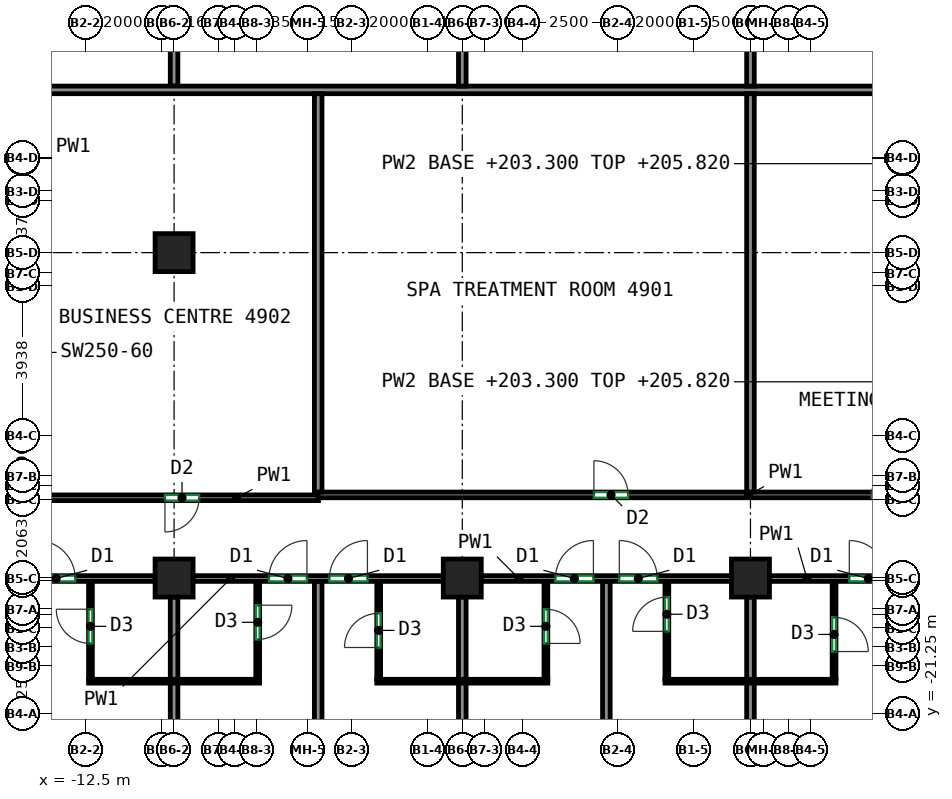
"""IFC4 building model, lengths in metres.
Left out: names, types, materials, properties, quantities, classifications, styles, units other than length and angle.
Written with IfcOpenShell. Run it as: python <this file> out.ifc"""

import sys

from ifc_helpers import new_model, si_unit, direction, frame, frame_2d, origin, origin_2d, place, context, subcontext, project, spatial, rectangle, extrude, source, transform, mapped, element, fill, save


model = new_model("IFC4")
c1 = context("Model", 3, precision=1e-05, world=origin(), true_north=direction((0.0, 1.0)))
c2 = subcontext(c1, "Body", "Model", "MODEL_VIEW")
j1 = project(units=[si_unit("LENGTHUNIT", "METRE"), si_unit("PLANEANGLEUNIT", "RADIAN")], contexts=[c1])
p1 = place(None, origin())
s1 = spatial("IfcSite", under=j1, at=p1, CompositionType="ELEMENT")
p2 = place(p1, origin())
s2 = spatial("IfcBuilding", under=s1, at=p2, CompositionType="ELEMENT")
p3 = place(p2, frame((0.0, 0.0, 203.3)))
s3 = spatial("IfcBuildingStorey", under=s2, at=p3, CompositionType="ELEMENT", Elevation=203.3)
m1 = source(origin(), c2, "Body", "SweptSolid", [
    extrude(rectangle(XDim=1.0, YDim=1.0, at=origin_2d()), origin(), (0.0, 0.0, 1.0), 3.12),
])
for number, where, z_axis, x_axis in (
    (1, (-10.167, -17.688, 0.0), (0.0, 0.0, 1.0), (1.0, 0.0, 0.0)),
    (2, (-10.167, -9.125, 0.0), (0.0, 0.0, 1.0), (1.0, 0.0, 0.0)),
    (3, (-2.583, -17.688, 0.0), (0.0, 0.0, 1.0), (1.0, 0.0, 0.0)),
    (4, (5.0, -17.688, 0.0), (0.0, 0.0, 1.0), (1.0, 0.0, 0.0)),
):
    element("IfcColumn", number, at=place(p3, frame(where, z_axis=z_axis, x_axis=x_axis)), inside=s3, PredefinedType="COLUMN", context=c2, shape_type="MappedRepresentation", body=[
        mapped(m1, transform((0.0, 0.0, 0.0))),
    ])
p4 = place(p3, frame((-18.9, -17.7, 0.0), z_axis=(0.0, 0.0, 1.0), x_axis=(1.0, 0.0, 0.0)))
e5 = element("IfcWall", 5, at=p4, inside=s3, PredefinedType="PARTITIONING", context=c2, shape_type="SweptSolid", body=[
    extrude(rectangle(XDim=8.233, YDim=0.15, at=frame_2d((4.116, 0.0))), origin(), (0.0, 0.0, 1.0), 2.52),
])
p5 = place(p4, frame((1.135, 0.0, 0.0)))
e6 = element("IfcOpeningElement", 6, at=p5, cuts=e5, PredefinedType="OPENING", context=c2, shape_type="SweptSolid", body=[
    extrude(rectangle(XDim=1.0, YDim=2.1, at=frame_2d((0.5, 1.05))), frame((0.0, 0.085, 0.0), z_axis=(0.0, -1.0, 0.0), x_axis=(1.0, 0.0, 0.0)), (0.0, 0.0, 1.0), 0.17),
])
p6 = place(p4, frame((5.131, 0.0, 0.0)))
e7 = element("IfcOpeningElement", 7, at=p6, cuts=e5, PredefinedType="OPENING", context=c2, shape_type="SweptSolid", body=[
    extrude(rectangle(XDim=1.0, YDim=2.1, at=frame_2d((0.5, 1.05))), frame((0.0, 0.085, 0.0), z_axis=(0.0, -1.0, 0.0), x_axis=(1.0, 0.0, 0.0)), (0.0, 0.0, 1.0), 0.17),
])
p7 = place(p3, frame((-9.667, -17.7, 0.0), z_axis=(0.0, 0.0, 1.0), x_axis=(1.0, 0.0, 0.0)))
e8 = element("IfcWall", 8, at=p7, inside=s3, PredefinedType="PARTITIONING", context=c2, shape_type="SweptSolid", body=[
    extrude(rectangle(XDim=6.584, YDim=0.15, at=frame_2d((3.292, 0.0))), origin(), (0.0, 0.0, 1.0), 3.12),
])
p8 = place(p7, frame((1.996, 0.0, 0.0)))
e9 = element("IfcOpeningElement", 9, at=p8, cuts=e8, PredefinedType="OPENING", context=c2, shape_type="SweptSolid", body=[
    extrude(rectangle(XDim=1.0, YDim=2.1, at=frame_2d((0.5, 1.05))), frame((0.0, 0.085, 0.0), z_axis=(0.0, -1.0, 0.0), x_axis=(1.0, 0.0, 0.0)), (0.0, 0.0, 1.0), 0.17),
])
p9 = place(p7, frame((3.588, 0.0, 0.0)))
e10 = element("IfcOpeningElement", 10, at=p9, cuts=e8, PredefinedType="OPENING", context=c2, shape_type="SweptSolid", body=[
    extrude(rectangle(XDim=1.0, YDim=2.1, at=frame_2d((0.5, 1.05))), frame((0.0, 0.085, 0.0), z_axis=(0.0, -1.0, 0.0), x_axis=(1.0, 0.0, 0.0)), (0.0, 0.0, 1.0), 0.17),
])
p10 = place(p3, frame((-2.083, -17.7, 0.0), z_axis=(0.0, 0.0, 1.0), x_axis=(1.0, 0.0, 0.0)))
e11 = element("IfcWall", 11, at=p10, inside=s3, PredefinedType="PARTITIONING", context=c2, shape_type="SweptSolid", body=[
    extrude(rectangle(XDim=6.583, YDim=0.15, at=frame_2d((3.292, 0.0))), origin(), (0.0, 0.0, 1.0), 3.12),
])
p11 = place(p10, frame((1.95, 0.0, 0.0)))
e12 = element("IfcOpeningElement", 12, at=p11, cuts=e11, PredefinedType="OPENING", context=c2, shape_type="SweptSolid", body=[
    extrude(rectangle(XDim=1.0, YDim=2.1, at=frame_2d((0.5, 1.05))), frame((0.0, 0.085, 0.0), z_axis=(0.0, -1.0, 0.0), x_axis=(1.0, 0.0, 0.0)), (0.0, 0.0, 1.0), 0.17),
])
p12 = place(p10, frame((3.632, 0.0, 0.0)))
e13 = element("IfcOpeningElement", 13, at=p12, cuts=e11, PredefinedType="OPENING", context=c2, shape_type="SweptSolid", body=[
    extrude(rectangle(XDim=1.0, YDim=2.1, at=frame_2d((0.5, 1.05))), frame((0.0, 0.085, 0.0), z_axis=(0.0, -1.0, 0.0), x_axis=(1.0, 0.0, 0.0)), (0.0, 0.0, 1.0), 0.17),
])
p13 = place(p3, frame((5.5, -17.7, 0.0), z_axis=(0.0, 0.0, 1.0), x_axis=(1.0, 0.0, 0.0)))
e14 = element("IfcWall", 14, at=p13, inside=s3, PredefinedType="PARTITIONING", context=c2, shape_type="SweptSolid", body=[
    extrude(rectangle(XDim=6.583, YDim=0.15, at=frame_2d((3.292, 0.0))), origin(), (0.0, 0.0, 1.0), 3.12),
])
p14 = place(p13, frame((2.101, 0.0, 0.0)))
e15 = element("IfcOpeningElement", 15, at=p14, cuts=e14, PredefinedType="OPENING", context=c2, shape_type="SweptSolid", body=[
    extrude(rectangle(XDim=1.0, YDim=2.1, at=frame_2d((0.5, 1.05))), frame((0.0, 0.085, 0.0), z_axis=(0.0, -1.0, 0.0), x_axis=(1.0, 0.0, 0.0)), (0.0, 0.0, 1.0), 0.17),
])
p15 = place(p13, frame((3.587, 0.0, 0.0)))
e16 = element("IfcOpeningElement", 16, at=p15, cuts=e14, PredefinedType="OPENING", context=c2, shape_type="SweptSolid", body=[
    extrude(rectangle(XDim=1.0, YDim=2.1, at=frame_2d((0.5, 1.05))), frame((0.0, 0.085, 0.0), z_axis=(0.0, -1.0, 0.0), x_axis=(1.0, 0.0, 0.0)), (0.0, 0.0, 1.0), 0.17),
])
p16 = place(p3, frame((-6.365, -15.575, 0.0), z_axis=(0.0, 0.0, 1.0), x_axis=(-1.0, 0.0, 0.0)))
e17 = element("IfcWall", 17, at=p16, inside=s3, PredefinedType="PARTITIONING", context=c2, shape_type="SweptSolid", body=[
    extrude(rectangle(XDim=7.185, YDim=0.15, at=frame_2d((3.593, 0.0))), origin(), (0.0, 0.0, 1.0), 3.12),
])
p17 = place(p16, frame((3.143, 0.0, 0.0)))
e18 = element("IfcOpeningElement", 18, at=p17, cuts=e17, PredefinedType="OPENING", context=c2, shape_type="SweptSolid", body=[
    extrude(rectangle(XDim=0.9, YDim=2.1, at=frame_2d((0.45, 1.05))), frame((0.0, 0.085, 0.0), z_axis=(0.0, -1.0, 0.0), x_axis=(1.0, 0.0, 0.0)), (0.0, 0.0, 1.0), 0.17),
])
p18 = place(p3, frame((-6.385, -15.5, 0.0), z_axis=(0.0, 0.0, 1.0), x_axis=(1.0, 0.0, 0.0)))
e19 = element("IfcWall", 19, at=p18, inside=s3, PredefinedType="PARTITIONING", context=c2, shape_type="SweptSolid", body=[
    extrude(rectangle(XDim=22.66, YDim=0.15, at=frame_2d((11.33, 0.0))), origin(), (0.0, 0.0, 1.0), 3.12),
])
p19 = place(p18, frame((7.266, 0.0, 0.0)))
e20 = element("IfcOpeningElement", 20, at=p19, cuts=e19, PredefinedType="OPENING", context=c2, shape_type="SweptSolid", body=[
    extrude(rectangle(XDim=0.9, YDim=2.1, at=frame_2d((0.45, 1.05))), frame((0.0, 0.085, 0.0), z_axis=(0.0, -1.0, 0.0), x_axis=(1.0, 0.0, 0.0)), (0.0, 0.0, 1.0), 0.17),
])
p20 = place(p18, frame((14.576, 0.0, 0.0)))
e21 = element("IfcOpeningElement", 21, at=p20, cuts=e19, PredefinedType="OPENING", context=c2, shape_type="SweptSolid", body=[
    extrude(rectangle(XDim=0.9, YDim=2.1, at=frame_2d((0.45, 1.05))), frame((0.0, 0.085, 0.0), z_axis=(0.0, -1.0, 0.0), x_axis=(1.0, 0.0, 0.0)), (0.0, 0.0, 1.0), 0.17),
])
p21 = place(p3, frame((-12.367, -20.352, 0.0), z_axis=(0.0, 0.0, 1.0), x_axis=(0.0, 1.0, 0.0)))
e22 = element("IfcWall", 22, at=p21, inside=s3, PredefinedType="PARTITIONING", context=c2, shape_type="SweptSolid", body=[
    extrude(rectangle(XDim=2.575, YDim=0.1, at=frame_2d((1.288, 0.0))), origin(), (0.0, 0.0, 1.0), 3.12),
])
p22 = place(p21, frame((0.944, 0.0, 0.0)))
e23 = element("IfcOpeningElement", 23, at=p22, cuts=e22, PredefinedType="OPENING", context=c2, shape_type="SweptSolid", body=[
    extrude(rectangle(XDim=0.9, YDim=2.1, at=frame_2d((0.45, 1.05))), frame((0.0, 0.06, 0.0), z_axis=(0.0, -1.0, 0.0), x_axis=(1.0, 0.0, 0.0)), (0.0, 0.0, 1.0), 0.12),
])
p23 = place(p3, frame((-12.417, -20.402, 0.0), z_axis=(0.0, 0.0, 1.0), x_axis=(1.0, 0.0, 0.0)))
e24 = element("IfcWall", 24, at=p23, inside=s3, PredefinedType="PARTITIONING", context=c2, shape_type="SweptSolid", body=[
    extrude(rectangle(XDim=4.5, YDim=0.1, at=frame_2d((2.25, 0.0))), origin(), (0.0, 0.0, 1.0), 3.12),
])
p24 = place(p3, frame((-10.167, -25.425, 0.0), z_axis=(0.0, 0.0, 1.0), x_axis=(0.0, 1.0, 0.0)))
e25 = element("IfcWall", 25, at=p24, inside=s3, PredefinedType="PARTITIONING", context=c2, shape_type="SweptSolid", body=[
    extrude(rectangle(XDim=4.973, YDim=0.2, at=frame_2d((2.487, 0.0))), origin(), (0.0, 0.0, 1.0), 3.12),
])
p25 = place(p3, frame((-10.167, -20.352, 0.0), z_axis=(0.0, 0.0, 1.0), x_axis=(0.0, 1.0, 0.0)))
e26 = element("IfcWall", 26, at=p25, inside=s3, PredefinedType="PARTITIONING", context=c2, shape_type="SweptSolid", body=[
    extrude(rectangle(XDim=2.164, YDim=0.2, at=frame_2d((1.082, 0.0))), origin(), (0.0, 0.0, 1.0), 3.12),
])
p26 = place(p3, frame((-7.967, -17.777, 0.0), z_axis=(0.0, 0.0, 1.0), x_axis=(0.0, -1.0, 0.0)))
e27 = element("IfcWall", 27, at=p26, inside=s3, PredefinedType="PARTITIONING", context=c2, shape_type="SweptSolid", body=[
    extrude(rectangle(XDim=2.575, YDim=0.1, at=frame_2d((1.288, 0.0))), origin(), (0.0, 0.0, 1.0), 3.12),
])
p27 = place(p26, frame((0.625, 0.0, 0.0)))
e28 = element("IfcOpeningElement", 28, at=p27, cuts=e27, PredefinedType="OPENING", context=c2, shape_type="SweptSolid", body=[
    extrude(rectangle(XDim=0.9, YDim=2.1, at=frame_2d((0.45, 1.05))), frame((0.0, 0.06, 0.0), z_axis=(0.0, -1.0, 0.0), x_axis=(1.0, 0.0, 0.0)), (0.0, 0.0, 1.0), 0.12),
])
p28 = place(p3, frame((-6.375, -26.0, 0.0), z_axis=(0.0, 0.0, 1.0), x_axis=(0.0, 1.0, 0.0)))
e29 = element("IfcWall", 29, at=p28, inside=s3, PredefinedType="PARTITIONING", context=c2, shape_type="SweptSolid", body=[
    extrude(rectangle(XDim=8.223, YDim=0.2, at=frame_2d((4.111, 0.0))), origin(), (0.0, 0.0, 1.0), 3.12),
])
p29 = place(p3, frame((-4.783, -20.352, 0.0), z_axis=(0.0, 0.0, 1.0), x_axis=(0.0, 1.0, 0.0)))
e30 = element("IfcWall", 30, at=p29, inside=s3, PredefinedType="PARTITIONING", context=c2, shape_type="SweptSolid", body=[
    extrude(rectangle(XDim=2.575, YDim=0.1, at=frame_2d((1.288, 0.0))), origin(), (0.0, 0.0, 1.0), 3.12),
])
p30 = place(p29, frame((0.837, 0.0, 0.0)))
e31 = element("IfcOpeningElement", 31, at=p30, cuts=e30, PredefinedType="OPENING", context=c2, shape_type="SweptSolid", body=[
    extrude(rectangle(XDim=0.9, YDim=2.1, at=frame_2d((0.45, 1.05))), frame((0.0, 0.06, 0.0), z_axis=(0.0, -1.0, 0.0), x_axis=(1.0, 0.0, 0.0)), (0.0, 0.0, 1.0), 0.12),
])
p31 = place(p3, frame((-4.833, -20.402, 0.0), z_axis=(0.0, 0.0, 1.0), x_axis=(1.0, 0.0, 0.0)))
e32 = element("IfcWall", 32, at=p31, inside=s3, PredefinedType="PARTITIONING", context=c2, shape_type="SweptSolid", body=[
    extrude(rectangle(XDim=4.5, YDim=0.1, at=frame_2d((2.25, 0.0))), origin(), (0.0, 0.0, 1.0), 3.12),
])
p32 = place(p3, frame((-2.583, -25.425, 0.0), z_axis=(0.0, 0.0, 1.0), x_axis=(0.0, 1.0, 0.0)))
e33 = element("IfcWall", 33, at=p32, inside=s3, PredefinedType="PARTITIONING", context=c2, shape_type="SweptSolid", body=[
    extrude(rectangle(XDim=4.973, YDim=0.2, at=frame_2d((2.487, 0.0))), origin(), (0.0, 0.0, 1.0), 3.12),
])
p33 = place(p3, frame((-2.583, -20.352, 0.0), z_axis=(0.0, 0.0, 1.0), x_axis=(0.0, 1.0, 0.0)))
e34 = element("IfcWall", 34, at=p33, inside=s3, PredefinedType="PARTITIONING", context=c2, shape_type="SweptSolid", body=[
    extrude(rectangle(XDim=2.164, YDim=0.2, at=frame_2d((1.082, 0.0))), origin(), (0.0, 0.0, 1.0), 3.12),
])
p34 = place(p3, frame((-0.383, -17.777, 0.0), z_axis=(0.0, 0.0, 1.0), x_axis=(0.0, -1.0, 0.0)))
e35 = element("IfcWall", 35, at=p34, inside=s3, PredefinedType="PARTITIONING", context=c2, shape_type="SweptSolid", body=[
    extrude(rectangle(XDim=2.575, YDim=0.1, at=frame_2d((1.288, 0.0))), origin(), (0.0, 0.0, 1.0), 3.12),
])
p35 = place(p34, frame((0.731, 0.0, 0.0)))
e36 = element("IfcOpeningElement", 36, at=p35, cuts=e35, PredefinedType="OPENING", context=c2, shape_type="SweptSolid", body=[
    extrude(rectangle(XDim=0.9, YDim=2.1, at=frame_2d((0.45, 1.05))), frame((0.0, 0.06, 0.0), z_axis=(0.0, -1.0, 0.0), x_axis=(1.0, 0.0, 0.0)), (0.0, 0.0, 1.0), 0.12),
])
p36 = place(p3, frame((1.208, -26.0, 0.0), z_axis=(0.0, 0.0, 1.0), x_axis=(0.0, 1.0, 0.0)))
e37 = element("IfcWall", 37, at=p36, inside=s3, PredefinedType="PARTITIONING", context=c2, shape_type="SweptSolid", body=[
    extrude(rectangle(XDim=8.223, YDim=0.2, at=frame_2d((4.111, 0.0))), origin(), (0.0, 0.0, 1.0), 3.12),
])
p37 = place(p3, frame((2.8, -20.352, 0.0), z_axis=(0.0, 0.0, 1.0), x_axis=(0.0, 1.0, 0.0)))
e38 = element("IfcWall", 38, at=p37, inside=s3, PredefinedType="PARTITIONING", context=c2, shape_type="SweptSolid", body=[
    extrude(rectangle(XDim=2.575, YDim=0.1, at=frame_2d((1.288, 0.0))), origin(), (0.0, 0.0, 1.0), 3.12),
])
p38 = place(p37, frame((1.262, 0.0, 0.0)))
e39 = element("IfcOpeningElement", 39, at=p38, cuts=e38, PredefinedType="OPENING", context=c2, shape_type="SweptSolid", body=[
    extrude(rectangle(XDim=0.9, YDim=2.1, at=frame_2d((0.45, 1.05))), frame((0.0, 0.06, 0.0), z_axis=(0.0, -1.0, 0.0), x_axis=(1.0, 0.0, 0.0)), (0.0, 0.0, 1.0), 0.12),
])
p39 = place(p3, frame((2.75, -20.402, 0.0), z_axis=(0.0, 0.0, 1.0), x_axis=(1.0, 0.0, 0.0)))
e40 = element("IfcWall", 40, at=p39, inside=s3, PredefinedType="PARTITIONING", context=c2, shape_type="SweptSolid", body=[
    extrude(rectangle(XDim=4.5, YDim=0.1, at=frame_2d((2.25, 0.0))), origin(), (0.0, 0.0, 1.0), 3.12),
])
p40 = place(p3, frame((5.0, -25.425, 0.0), z_axis=(0.0, 0.0, 1.0), x_axis=(0.0, 1.0, 0.0)))
e41 = element("IfcWall", 41, at=p40, inside=s3, PredefinedType="PARTITIONING", context=c2, shape_type="SweptSolid", body=[
    extrude(rectangle(XDim=4.973, YDim=0.2, at=frame_2d((2.487, 0.0))), origin(), (0.0, 0.0, 1.0), 3.12),
])
p41 = place(p3, frame((5.0, -20.352, 0.0), z_axis=(0.0, 0.0, 1.0), x_axis=(0.0, 1.0, 0.0)))
e42 = element("IfcWall", 42, at=p41, inside=s3, PredefinedType="PARTITIONING", context=c2, shape_type="SweptSolid", body=[
    extrude(rectangle(XDim=2.164, YDim=0.2, at=frame_2d((1.082, 0.0))), origin(), (0.0, 0.0, 1.0), 3.12),
])
p42 = place(p3, frame((7.2, -17.777, 0.0), z_axis=(0.0, 0.0, 1.0), x_axis=(0.0, -1.0, 0.0)))
e43 = element("IfcWall", 43, at=p42, inside=s3, PredefinedType="PARTITIONING", context=c2, shape_type="SweptSolid", body=[
    extrude(rectangle(XDim=2.575, YDim=0.1, at=frame_2d((1.288, 0.0))), origin(), (0.0, 0.0, 1.0), 3.12),
])
p43 = place(p42, frame((0.944, 0.0, 0.0)))
e44 = element("IfcOpeningElement", 44, at=p43, cuts=e43, PredefinedType="OPENING", context=c2, shape_type="SweptSolid", body=[
    extrude(rectangle(XDim=0.9, YDim=2.1, at=frame_2d((0.45, 1.05))), frame((0.0, 0.06, 0.0), z_axis=(0.0, -1.0, 0.0), x_axis=(1.0, 0.0, 0.0)), (0.0, 0.0, 1.0), 0.12),
])
p44 = place(p3, frame((-10.167, -4.743, 0.0), z_axis=(0.0, 0.0, 1.0), x_axis=(0.0, 1.0, 0.0)))
e45 = element("IfcWall", 45, at=p44, inside=s3, PredefinedType="PARTITIONING", context=c2, shape_type="SweptSolid", body=[
    extrude(rectangle(XDim=3.681, YDim=0.2, at=frame_2d((1.84, 0.0))), origin(), (0.0, 0.0, 1.0), 2.52),
])
p45 = place(p3, frame((-13.873, -4.843, 0.0), z_axis=(0.0, 0.0, 1.0), x_axis=(1.0, 0.0, 0.0)))
e46 = element("IfcWall", 46, at=p45, inside=s3, PredefinedType="PARTITIONING", context=c2, shape_type="SweptSolid", body=[
    extrude(rectangle(XDim=30.146, YDim=0.2, at=frame_2d((15.073, 0.0))), origin(), (0.0, 0.0, 1.0), 3.12),
])
for number, where, z_axis, x_axis in (
    (47, (-2.583, -4.743, 0.0), (0.0, 0.0, 1.0), (0.0, 1.0, 0.0)),
    (48, (5.0, -4.743, 0.0), (0.0, 0.0, 1.0), (0.0, 1.0, 0.0)),
):
    element("IfcWall", number, at=place(p3, frame(where, z_axis=z_axis, x_axis=x_axis)), inside=s3, PredefinedType="PARTITIONING", context=c2, shape_type="SweptSolid", body=[
        extrude(rectangle(XDim=8.366, YDim=0.2, at=frame_2d((4.183, 0.0))), origin(), (0.0, 0.0, 1.0), 3.12),
    ])
for number, where, z_axis, x_axis in (
    (49, (-6.375, -15.423, 0.0), (0.0, 0.0, 1.0), (0.0, 1.0, 0.0)),
    (50, (5.0, -15.423, 0.0), (0.0, 0.0, 1.0), (0.0, 1.0, 0.0)),
):
    element("IfcWall", number, at=place(p3, frame(where, z_axis=z_axis, x_axis=x_axis)), inside=s3, PredefinedType="PARTITIONING", context=c2, shape_type="SweptSolid", body=[
        extrude(rectangle(XDim=10.48, YDim=0.2, at=frame_2d((5.24, 0.0))), origin(), (0.0, 0.0, 1.0), 3.12),
    ])
p46 = place(p43, origin())
e51 = element("IfcDoor", 51, at=p46, inside=s3, OperationType="SINGLE_SWING_RIGHT", PredefinedType="DOOR", context=c2, shape_type="SweptSolid", body=[
    extrude(rectangle(XDim=0.9, YDim=2.1, at=frame_2d((0.45, 1.05))), frame((0.0, 0.025, 0.0), z_axis=(0.0, -1.0, 0.0), x_axis=(1.0, 0.0, 0.0)), (0.0, 0.0, 1.0), 0.05),
])
fill(e44, e51)
p47 = place(p30, origin())
e52 = element("IfcDoor", 52, at=p47, inside=s3, OperationType="SINGLE_SWING_LEFT", PredefinedType="DOOR", context=c2, shape_type="SweptSolid", body=[
    extrude(rectangle(XDim=0.9, YDim=2.1, at=frame_2d((0.45, 1.05))), frame((0.0, 0.025, 0.0), z_axis=(0.0, -1.0, 0.0), x_axis=(1.0, 0.0, 0.0)), (0.0, 0.0, 1.0), 0.05),
])
fill(e31, e52)
p48 = place(p22, origin())
e53 = element("IfcDoor", 53, at=p48, inside=s3, OperationType="SINGLE_SWING_RIGHT", PredefinedType="DOOR", context=c2, shape_type="SweptSolid", body=[
    extrude(rectangle(XDim=0.9, YDim=2.1, at=frame_2d((0.45, 1.05))), frame((0.0, 0.025, 0.0), z_axis=(0.0, -1.0, 0.0), x_axis=(1.0, 0.0, 0.0)), (0.0, 0.0, 1.0), 0.05),
])
fill(e23, e53)
p49 = place(p35, origin())
e54 = element("IfcDoor", 54, at=p49, inside=s3, OperationType="SINGLE_SWING_RIGHT", PredefinedType="DOOR", context=c2, shape_type="SweptSolid", body=[
    extrude(rectangle(XDim=0.9, YDim=2.1, at=frame_2d((0.45, 1.05))), frame((0.0, 0.025, 0.0), z_axis=(0.0, -1.0, 0.0), x_axis=(1.0, 0.0, 0.0)), (0.0, 0.0, 1.0), 0.05),
])
fill(e36, e54)
p50 = place(p27, origin())
e55 = element("IfcDoor", 55, at=p50, inside=s3, OperationType="SINGLE_SWING_LEFT", PredefinedType="DOOR", context=c2, shape_type="SweptSolid", body=[
    extrude(rectangle(XDim=0.9, YDim=2.1, at=frame_2d((0.45, 1.05))), frame((0.0, 0.025, 0.0), z_axis=(0.0, -1.0, 0.0), x_axis=(1.0, 0.0, 0.0)), (0.0, 0.0, 1.0), 0.05),
])
fill(e28, e55)
p51 = place(p38, origin())
e56 = element("IfcDoor", 56, at=p51, inside=s3, OperationType="SINGLE_SWING_LEFT", PredefinedType="DOOR", context=c2, shape_type="SweptSolid", body=[
    extrude(rectangle(XDim=0.9, YDim=2.1, at=frame_2d((0.45, 1.05))), frame((0.0, 0.025, 0.0), z_axis=(0.0, -1.0, 0.0), x_axis=(1.0, 0.0, 0.0)), (0.0, 0.0, 1.0), 0.05),
])
fill(e39, e56)
p52 = place(p6, origin())
e57 = element("IfcDoor", 57, at=p52, inside=s3, OperationType="SINGLE_SWING_LEFT", PredefinedType="DOOR", context=c2, shape_type="SweptSolid", body=[
    extrude(rectangle(XDim=1.0, YDim=2.1, at=frame_2d((0.5, 1.05))), frame((0.0, 0.025, 0.0), z_axis=(0.0, -1.0, 0.0), x_axis=(1.0, 0.0, 0.0)), (0.0, 0.0, 1.0), 0.05),
])
fill(e7, e57)
p53 = place(p8, origin())
e58 = element("IfcDoor", 58, at=p53, inside=s3, OperationType="SINGLE_SWING_RIGHT", PredefinedType="DOOR", context=c2, shape_type="SweptSolid", body=[
    extrude(rectangle(XDim=1.0, YDim=2.1, at=frame_2d((0.5, 1.05))), frame((0.0, 0.025, 0.0), z_axis=(0.0, -1.0, 0.0), x_axis=(1.0, 0.0, 0.0)), (0.0, 0.0, 1.0), 0.05),
])
fill(e9, e58)
p54 = place(p9, origin())
e59 = element("IfcDoor", 59, at=p54, inside=s3, OperationType="SINGLE_SWING_RIGHT", PredefinedType="DOOR", context=c2, shape_type="SweptSolid", body=[
    extrude(rectangle(XDim=1.0, YDim=2.1, at=frame_2d((0.5, 1.05))), frame((0.0, 0.025, 0.0), z_axis=(0.0, -1.0, 0.0), x_axis=(1.0, 0.0, 0.0)), (0.0, 0.0, 1.0), 0.05),
])
fill(e10, e59)
p55 = place(p11, origin())
e60 = element("IfcDoor", 60, at=p55, inside=s3, OperationType="SINGLE_SWING_RIGHT", PredefinedType="DOOR", context=c2, shape_type="SweptSolid", body=[
    extrude(rectangle(XDim=1.0, YDim=2.1, at=frame_2d((0.5, 1.05))), frame((0.0, 0.025, 0.0), z_axis=(0.0, -1.0, 0.0), x_axis=(1.0, 0.0, 0.0)), (0.0, 0.0, 1.0), 0.05),
])
fill(e12, e60)
p56 = place(p12, origin())
e61 = element("IfcDoor", 61, at=p56, inside=s3, OperationType="SINGLE_SWING_LEFT", PredefinedType="DOOR", context=c2, shape_type="SweptSolid", body=[
    extrude(rectangle(XDim=1.0, YDim=2.1, at=frame_2d((0.5, 1.05))), frame((0.0, 0.025, 0.0), z_axis=(0.0, -1.0, 0.0), x_axis=(1.0, 0.0, 0.0)), (0.0, 0.0, 1.0), 0.05),
])
fill(e13, e61)
p57 = place(p14, origin())
e62 = element("IfcDoor", 62, at=p57, inside=s3, OperationType="SINGLE_SWING_LEFT", PredefinedType="DOOR", context=c2, shape_type="SweptSolid", body=[
    extrude(rectangle(XDim=1.0, YDim=2.1, at=frame_2d((0.5, 1.05))), frame((0.0, 0.025, 0.0), z_axis=(0.0, -1.0, 0.0), x_axis=(1.0, 0.0, 0.0)), (0.0, 0.0, 1.0), 0.05),
])
fill(e15, e62)
p58 = place(p17, origin())
e63 = element("IfcDoor", 63, at=p58, inside=s3, OperationType="SINGLE_SWING_RIGHT", PredefinedType="DOOR", context=c2, shape_type="SweptSolid", body=[
    extrude(rectangle(XDim=0.9, YDim=2.1, at=frame_2d((0.45, 1.05))), frame((0.0, 0.025, 0.0), z_axis=(0.0, -1.0, 0.0), x_axis=(1.0, 0.0, 0.0)), (0.0, 0.0, 1.0), 0.05),
])
fill(e18, e63)
p59 = place(p19, origin())
e64 = element("IfcDoor", 64, at=p59, inside=s3, OperationType="SINGLE_SWING_LEFT", PredefinedType="DOOR", context=c2, shape_type="SweptSolid", body=[
    extrude(rectangle(XDim=0.9, YDim=2.1, at=frame_2d((0.45, 1.05))), frame((0.0, 0.025, 0.0), z_axis=(0.0, -1.0, 0.0), x_axis=(1.0, 0.0, 0.0)), (0.0, 0.0, 1.0), 0.05),
])
fill(e20, e64)
p60 = place(p20, origin())
e65 = element("IfcDoor", 65, at=p60, inside=s3, OperationType="SINGLE_SWING_RIGHT", PredefinedType="DOOR", context=c2, shape_type="SweptSolid", body=[
    extrude(rectangle(XDim=0.9, YDim=2.1, at=frame_2d((0.45, 1.05))), frame((0.0, 0.025, 0.0), z_axis=(0.0, -1.0, 0.0), x_axis=(1.0, 0.0, 0.0)), (0.0, 0.0, 1.0), 0.05),
])
fill(e21, e65)
save(model, sys.argv[1])
